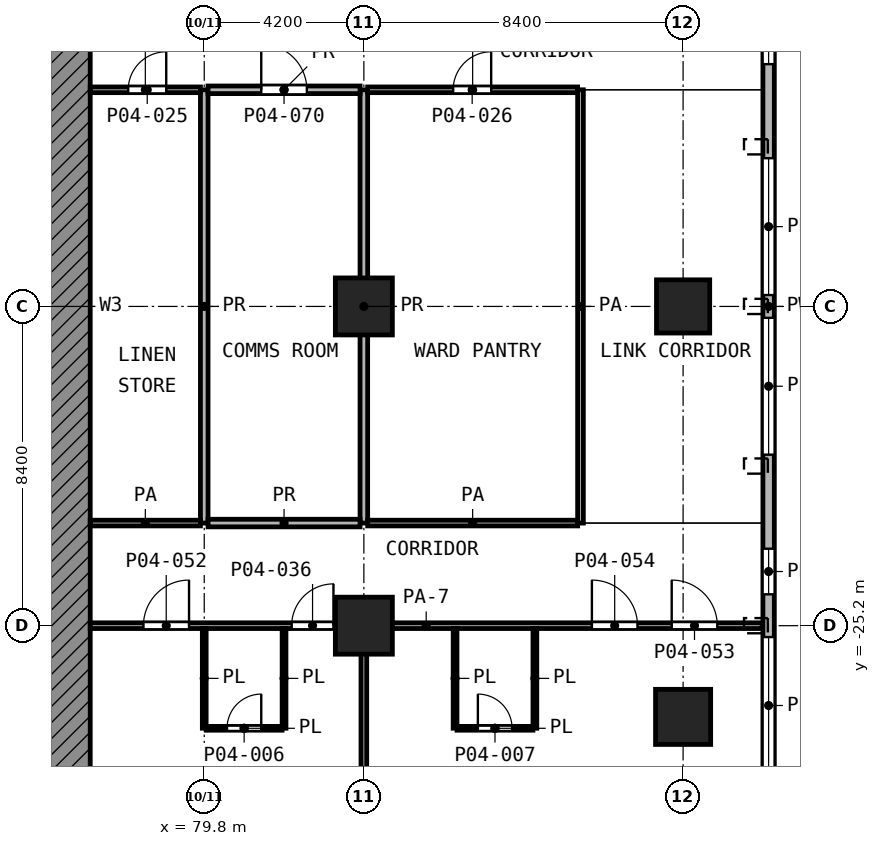
"""IFC4 building model, lengths in metres.
Left out: names, types, materials, properties, quantities, classifications, styles, units other than length and angle.
Written with IfcOpenShell. Run it as: python <this file> out.ifc"""

import sys

from ifc_helpers import new_model, si_unit, direction, frame, frame_2d, origin, origin_2d, place, context, subcontext, project, spatial, polyline, rectangle, outline, extrude, element, fill, save


model = new_model("IFC4")
c1 = context("Model", 3, precision=1e-05, world=origin(), true_north=direction((0.0, 1.0)))
c2 = subcontext(c1, "Body", "Model", "MODEL_VIEW")
j1 = project(units=[si_unit("LENGTHUNIT", "METRE"), si_unit("PLANEANGLEUNIT", "RADIAN")], contexts=[c1])
p1 = place(None, origin())
s1 = spatial("IfcSite", under=j1, at=p1, CompositionType="ELEMENT")
p2 = place(p1, origin())
s2 = spatial("IfcBuilding", under=s1, at=p2, CompositionType="ELEMENT")
p3 = place(p2, frame((0.0, 0.0, 18.2)))
s3 = spatial("IfcBuildingStorey", under=s2, at=p3, CompositionType="ELEMENT", Elevation=18.2)
p4 = place(p3, frame((84.0, -16.8, 0.0), z_axis=(0.0, 0.0, 1.0), x_axis=(1.0, 0.0, 0.0)))
e1 = element("IfcColumn", 1, at=p4, inside=s3, PredefinedType="COLUMN", context=c2, shape_type="SweptSolid", body=[
    extrude(rectangle(XDim=1.5, YDim=1.5, at=origin_2d()), origin(), (0.0, 0.0, 1.0), 5.6),
])
p5 = place(p3, frame((92.4, -16.8, 0.0), z_axis=(0.0, 0.0, 1.0), x_axis=(1.0, 0.0, 0.0)))
e2 = element("IfcColumn", 2, at=p5, inside=s3, PredefinedType="COLUMN", context=c2, shape_type="SweptSolid", body=[
    extrude(rectangle(XDim=1.4, YDim=1.4, at=origin_2d()), origin(), (0.0, 0.0, 1.0), 5.6),
])
p6 = place(p3, frame((84.0, -25.2, 0.0), z_axis=(0.0, 0.0, 1.0), x_axis=(1.0, 0.0, 0.0)))
e3 = element("IfcColumn", 3, at=p6, inside=s3, PredefinedType="COLUMN", context=c2, shape_type="SweptSolid", body=[
    extrude(rectangle(XDim=1.5, YDim=1.5, at=origin_2d()), origin(), (0.0, 0.0, 1.0), 5.6),
])
p7 = place(p3, frame((92.4, -27.6, 0.0), z_axis=(0.0, 0.0, 1.0), x_axis=(1.0, 0.0, 0.0)))
e4 = element("IfcColumn", 4, at=p7, inside=s3, PredefinedType="COLUMN", context=c2, shape_type="SweptSolid", body=[
    extrude(rectangle(XDim=1.45, YDim=1.45, at=origin_2d()), origin(), (0.0, 0.0, 1.0), 5.6),
])
p8 = place(p3, frame((0.0, 0.0, -18.2), z_axis=(0.0, -1.0, 0.0), x_axis=(1.0, 0.0, 0.0)))
e5 = element("IfcWall", 5, at=p8, inside=s3, PredefinedType="SHEAR", context=c2, shape_type="SweptSolid", body=[
    extrude(outline(polyline([(76.8, 23.25), (76.8, 18.2), (71.462, 18.2), (70.576, 19.406), (68.994, 21.022), (67.2, 22.4), (67.2, 23.25), (76.8, 23.25)])), origin(), (0.0, 0.0, 1.0), 33.6),
])
p9 = place(p3, frame((94.65, -29.938, 0.0), z_axis=(0.0, 0.0, 1.0), x_axis=(0.0, 1.0, 0.0)))
e6 = element("IfcWall", 6, at=p9, inside=s3, PredefinedType="SOLIDWALL", context=c2, shape_type="SweptSolid", body=[
    extrude(rectangle(XDim=26.276, YDim=0.3, at=frame_2d((13.138, 0.0))), origin(), (0.0, 0.0, 1.0), 5.05),
])
p10 = place(p9, frame((0.838, 0.0, 0.9)))
e7 = element("IfcOpeningElement", 7, at=p10, cuts=e6, PredefinedType="OPENING", context=c2, shape_type="SweptSolid", body=[
    extrude(rectangle(XDim=3.6, YDim=3.0, at=frame_2d((1.8, 1.5))), frame((0.0, 0.16, 0.0), z_axis=(0.0, -1.0, 0.0), x_axis=(1.0, 0.0, 0.0)), (0.0, 0.0, 1.0), 0.32),
])
p11 = place(p9, frame((5.563, 0.0, 0.9)))
e8 = element("IfcOpeningElement", 8, at=p11, cuts=e6, PredefinedType="OPENING", context=c2, shape_type="SweptSolid", body=[
    extrude(rectangle(XDim=1.2, YDim=3.0, at=frame_2d((0.6, 1.5))), frame((0.0, 0.16, 0.0), z_axis=(0.0, -1.0, 0.0), x_axis=(1.0, 0.0, 0.0)), (0.0, 0.0, 1.0), 0.32),
])
p12 = place(p9, frame((9.238, 0.0, 0.9)))
e9 = element("IfcOpeningElement", 9, at=p12, cuts=e6, PredefinedType="OPENING", context=c2, shape_type="SweptSolid", body=[
    extrude(rectangle(XDim=3.6, YDim=3.0, at=frame_2d((1.8, 1.5))), frame((0.0, 0.16, 0.0), z_axis=(0.0, -1.0, 0.0), x_axis=(1.0, 0.0, 0.0)), (0.0, 0.0, 1.0), 0.32),
])
p13 = place(p9, frame((13.438, 0.0, 0.9)))
e10 = element("IfcOpeningElement", 10, at=p13, cuts=e6, PredefinedType="OPENING", context=c2, shape_type="SweptSolid", body=[
    extrude(rectangle(XDim=3.6, YDim=3.0, at=frame_2d((1.8, 1.5))), frame((0.0, 0.16, 0.0), z_axis=(0.0, -1.0, 0.0), x_axis=(1.0, 0.0, 0.0)), (0.0, 0.0, 1.0), 0.32),
])
p14 = place(p9, frame((19.513, 0.0, 0.9)))
e11 = element("IfcOpeningElement", 11, at=p14, cuts=e6, PredefinedType="OPENING", context=c2, shape_type="SweptSolid", body=[
    extrude(rectangle(XDim=1.2, YDim=3.0, at=frame_2d((0.6, 1.5))), frame((0.0, 0.16, 0.0), z_axis=(0.0, -1.0, 0.0), x_axis=(1.0, 0.0, 0.0)), (0.0, 0.0, 1.0), 0.32),
])
p15 = place(p9, frame((21.838, 0.0, 0.9)))
e12 = element("IfcOpeningElement", 12, at=p15, cuts=e6, PredefinedType="OPENING", context=c2, shape_type="SweptSolid", body=[
    extrude(rectangle(XDim=3.6, YDim=3.0, at=frame_2d((1.8, 1.5))), frame((0.0, 0.16, 0.0), z_axis=(0.0, -1.0, 0.0), x_axis=(1.0, 0.0, 0.0)), (0.0, 0.0, 1.0), 0.32),
])
p16 = place(p3, frame((79.852, -27.9, 0.0), z_axis=(0.0, 0.0, 1.0), x_axis=(1.0, 0.0, 0.0)))
e13 = element("IfcWall", 13, at=p16, inside=s3, PredefinedType="PARTITIONING", context=c2, shape_type="SweptSolid", body=[
    extrude(rectangle(XDim=1.996, YDim=0.1, at=frame_2d((0.998, 0.0))), origin(), (0.0, 0.0, 1.0), 5.05),
])
p17 = place(p16, frame((0.548, 0.0, 0.0)))
e14 = element("IfcOpeningElement", 14, at=p17, cuts=e13, PredefinedType="OPENING", context=c2, shape_type="SweptSolid", body=[
    extrude(rectangle(XDim=0.9, YDim=2.1, at=frame_2d((0.45, 1.05))), frame((0.0, 0.06, 0.0), z_axis=(0.0, -1.0, 0.0), x_axis=(1.0, 0.0, 0.0)), (0.0, 0.0, 1.0), 0.12),
])
p18 = place(p3, frame((86.452, -27.9, 0.0), z_axis=(0.0, 0.0, 1.0), x_axis=(1.0, 0.0, 0.0)))
e15 = element("IfcWall", 15, at=p18, inside=s3, PredefinedType="PARTITIONING", context=c2, shape_type="SweptSolid", body=[
    extrude(rectangle(XDim=1.996, YDim=0.1, at=frame_2d((0.998, 0.0))), origin(), (0.0, 0.0, 1.0), 5.05),
])
p19 = place(p18, frame((0.548, 0.0, 0.0)))
e16 = element("IfcOpeningElement", 16, at=p19, cuts=e15, PredefinedType="OPENING", context=c2, shape_type="SweptSolid", body=[
    extrude(rectangle(XDim=0.9, YDim=2.1, at=frame_2d((0.45, 1.05))), frame((0.0, 0.06, 0.0), z_axis=(0.0, -1.0, 0.0), x_axis=(1.0, 0.0, 0.0)), (0.0, 0.0, 1.0), 0.12),
])
p20 = place(p3, frame((79.8, -27.898, 0.0), z_axis=(0.0, 0.0, 1.0), x_axis=(0.0, 1.0, 0.0)))
e17 = element("IfcWall", 17, at=p20, inside=s3, PredefinedType="PARTITIONING", context=c2, shape_type="SweptSolid", body=[
    extrude(rectangle(XDim=2.623, YDim=0.1, at=frame_2d((1.312, 0.0))), origin(), (0.0, 0.0, 1.0), 5.05),
])
p21 = place(p3, frame((81.9, -27.899, 0.0), z_axis=(0.0, 0.0, 1.0), x_axis=(0.0, 1.0, 0.0)))
e18 = element("IfcWall", 18, at=p21, inside=s3, PredefinedType="PARTITIONING", context=c2, shape_type="SweptSolid", body=[
    extrude(rectangle(XDim=2.624, YDim=0.1, at=frame_2d((1.312, 0.0))), origin(), (0.0, 0.0, 1.0), 5.05),
])
p22 = place(p3, frame((86.4, -27.898, 0.0), z_axis=(0.0, 0.0, 1.0), x_axis=(0.0, 1.0, 0.0)))
e19 = element("IfcWall", 19, at=p22, inside=s3, PredefinedType="PARTITIONING", context=c2, shape_type="SweptSolid", body=[
    extrude(rectangle(XDim=2.623, YDim=0.1, at=frame_2d((1.312, 0.0))), origin(), (0.0, 0.0, 1.0), 5.05),
])
p23 = place(p3, frame((88.5, -27.899, 0.0), z_axis=(0.0, 0.0, 1.0), x_axis=(0.0, 1.0, 0.0)))
e20 = element("IfcWall", 20, at=p23, inside=s3, PredefinedType="PARTITIONING", context=c2, shape_type="SweptSolid", body=[
    extrude(rectangle(XDim=2.624, YDim=0.1, at=frame_2d((1.312, 0.0))), origin(), (0.0, 0.0, 1.0), 5.05),
])
p24 = place(p3, frame((76.8, -25.2, 0.0), z_axis=(0.0, 0.0, 1.0), x_axis=(1.0, 0.0, 0.0)))
e21 = element("IfcWall", 21, at=p24, inside=s3, PredefinedType="PARTITIONING", context=c2, shape_type="SweptSolid", body=[
    extrude(rectangle(XDim=17.68, YDim=0.15, at=frame_2d((8.84, 0.0))), origin(), (0.0, 0.0, 1.0), 3.65),
])
p25 = place(p24, frame((1.4, 0.0, 0.0)))
e22 = element("IfcOpeningElement", 22, at=p25, cuts=e21, PredefinedType="OPENING", context=c2, shape_type="SweptSolid", body=[
    extrude(rectangle(XDim=1.2, YDim=2.1, at=frame_2d((0.6, 1.05))), frame((0.0, 0.085, 0.0), z_axis=(0.0, -1.0, 0.0), x_axis=(1.0, 0.0, 0.0)), (0.0, 0.0, 1.0), 0.17),
])
p26 = place(p24, frame((5.3, 0.0, 0.0)))
e23 = element("IfcOpeningElement", 23, at=p26, cuts=e21, PredefinedType="OPENING", context=c2, shape_type="SweptSolid", body=[
    extrude(rectangle(XDim=1.1, YDim=2.1, at=frame_2d((0.55, 1.05))), frame((0.0, 0.085, 0.0), z_axis=(0.0, -1.0, 0.0), x_axis=(1.0, 0.0, 0.0)), (0.0, 0.0, 1.0), 0.17),
])
p27 = place(p24, frame((15.3, 0.0, 0.0)))
e24 = element("IfcOpeningElement", 24, at=p27, cuts=e21, PredefinedType="OPENING", context=c2, shape_type="SweptSolid", body=[
    extrude(rectangle(XDim=1.2, YDim=2.1, at=frame_2d((0.6, 1.05))), frame((0.0, 0.085, 0.0), z_axis=(0.0, -1.0, 0.0), x_axis=(1.0, 0.0, 0.0)), (0.0, 0.0, 1.0), 0.17),
])
p28 = place(p24, frame((13.2, 0.0, 0.0)))
e25 = element("IfcOpeningElement", 25, at=p28, cuts=e21, PredefinedType="OPENING", context=c2, shape_type="SweptSolid", body=[
    extrude(rectangle(XDim=1.2, YDim=2.1, at=frame_2d((0.6, 1.05))), frame((0.0, 0.085, 0.0), z_axis=(0.0, -1.0, 0.0), x_axis=(1.0, 0.0, 0.0)), (0.0, 0.0, 1.0), 0.17),
])
p29 = place(p3, frame((76.8, -22.5, 0.0), z_axis=(0.0, 0.0, 1.0), x_axis=(1.0, 0.0, 0.0)))
e26 = element("IfcWall", 26, at=p29, inside=s3, PredefinedType="PARTITIONING", context=c2, shape_type="SweptSolid", body=[
    extrude(rectangle(XDim=2.9, YDim=0.15, at=frame_2d((1.45, 0.0))), origin(), (0.0, 0.0, 1.0), 5.05),
])
p30 = place(p3, frame((84.1, -22.5, 0.0), z_axis=(0.0, 0.0, 1.0), x_axis=(1.0, 0.0, 0.0)))
e27 = element("IfcWall", 27, at=p30, inside=s3, PredefinedType="PARTITIONING", context=c2, shape_type="SweptSolid", body=[
    extrude(rectangle(XDim=5.525, YDim=0.15, at=frame_2d((2.762, 0.0))), origin(), (0.0, 0.0, 1.0), 5.05),
])
p31 = place(p3, frame((76.8, -11.1, 0.0), z_axis=(0.0, 0.0, 1.0), x_axis=(1.0, 0.0, 0.0)))
e28 = element("IfcWall", 28, at=p31, inside=s3, PredefinedType="PARTITIONING", context=c2, shape_type="SweptSolid", body=[
    extrude(rectangle(XDim=2.9, YDim=0.15, at=frame_2d((1.45, 0.0))), origin(), (0.0, 0.0, 1.0), 5.05),
])
p32 = place(p31, frame((1.0, 0.0, 0.0)))
e29 = element("IfcOpeningElement", 29, at=p32, cuts=e28, PredefinedType="OPENING", context=c2, shape_type="SweptSolid", body=[
    extrude(rectangle(XDim=1.0, YDim=2.1, at=frame_2d((0.5, 1.05))), frame((0.0, 0.085, 0.0), z_axis=(0.0, -1.0, 0.0), x_axis=(1.0, 0.0, 0.0)), (0.0, 0.0, 1.0), 0.17),
])
p33 = place(p3, frame((84.1, -11.1, 0.0), z_axis=(0.0, 0.0, 1.0), x_axis=(1.0, 0.0, 0.0)))
e30 = element("IfcWall", 30, at=p33, inside=s3, PredefinedType="PARTITIONING", context=c2, shape_type="SweptSolid", body=[
    extrude(rectangle(XDim=5.525, YDim=0.15, at=frame_2d((2.762, 0.0))), origin(), (0.0, 0.0, 1.0), 5.05),
])
p34 = place(p33, frame((2.25, 0.0, 0.0)))
e31 = element("IfcOpeningElement", 31, at=p34, cuts=e30, PredefinedType="OPENING", context=c2, shape_type="SweptSolid", body=[
    extrude(rectangle(XDim=1.0, YDim=2.1, at=frame_2d((0.5, 1.05))), frame((0.0, 0.085, 0.0), z_axis=(0.0, -1.0, 0.0), x_axis=(1.0, 0.0, 0.0)), (0.0, 0.0, 1.0), 0.17),
])
p35 = place(p3, frame((84.0, -35.68, 0.0), z_axis=(0.0, 0.0, 1.0), x_axis=(0.0, 1.0, 0.0)))
e32 = element("IfcWall", 32, at=p35, inside=s3, PredefinedType="PARTITIONING", context=c2, shape_type="SweptSolid", body=[
    extrude(rectangle(XDim=10.405, YDim=0.15, at=frame_2d((5.203, 0.0))), origin(), (0.0, 0.0, 1.0), 5.05),
])
p36 = place(p3, frame((89.7, -22.5, 0.0), z_axis=(0.0, 0.0, 1.0), x_axis=(0.0, 1.0, 0.0)))
e33 = element("IfcWall", 33, at=p36, inside=s3, PredefinedType="PARTITIONING", context=c2, shape_type="SweptSolid", body=[
    extrude(rectangle(XDim=11.4, YDim=0.15, at=frame_2d((5.7, 0.0))), origin(), (0.0, 0.0, 1.0), 5.05),
])
p37 = place(p3, frame((79.9, -22.5, 0.0), z_axis=(0.0, 0.0, 1.0), x_axis=(1.0, 0.0, 0.0)))
e34 = element("IfcWall", 34, at=p37, inside=s3, PredefinedType="PARTITIONING", context=c2, shape_type="SweptSolid", body=[
    extrude(rectangle(XDim=4.0, YDim=0.2, at=frame_2d((2.0, 0.0))), origin(), (0.0, 0.0, 1.0), 5.05),
])
p38 = place(p3, frame((79.9, -11.1, 0.0), z_axis=(0.0, 0.0, 1.0), x_axis=(1.0, 0.0, 0.0)))
e35 = element("IfcWall", 35, at=p38, inside=s3, PredefinedType="PARTITIONING", context=c2, shape_type="SweptSolid", body=[
    extrude(rectangle(XDim=4.0, YDim=0.2, at=frame_2d((2.0, 0.0))), origin(), (0.0, 0.0, 1.0), 5.05),
])
p39 = place(p38, frame((1.4, 0.0, 0.0)))
e36 = element("IfcOpeningElement", 36, at=p39, cuts=e35, PredefinedType="OPENING", context=c2, shape_type="SweptSolid", body=[
    extrude(rectangle(XDim=1.2, YDim=2.1, at=frame_2d((0.6, 1.05))), frame((0.0, 0.11, 0.0), z_axis=(0.0, -1.0, 0.0), x_axis=(1.0, 0.0, 0.0)), (0.0, 0.0, 1.0), 0.22),
])
for number, where, z_axis, x_axis in (
    (37, (79.8, -22.5, 0.0), (0.0, 0.0, 1.0), (0.0, 1.0, 0.0)),
    (38, (84.0, -22.5, 0.0), (0.0, 0.0, 1.0), (0.0, 1.0, 0.0)),
):
    element("IfcWall", number, at=place(p3, frame(where, z_axis=z_axis, x_axis=x_axis)), inside=s3, PredefinedType="PARTITIONING", context=c2, shape_type="SweptSolid", body=[
        extrude(rectangle(XDim=11.4, YDim=0.2, at=frame_2d((5.7, 0.0))), origin(), (0.0, 0.0, 1.0), 5.05),
    ])
p40 = place(p10, origin())
e39 = element("IfcWindow", 39, at=p40, inside=s3, PartitioningType="SINGLE_PANEL", PredefinedType="WINDOW", context=c2, shape_type="SweptSolid", body=[
    extrude(rectangle(XDim=3.6, YDim=3.0, at=frame_2d((1.8, 1.5))), frame((0.0, 0.03, 0.0), z_axis=(0.0, -1.0, 0.0), x_axis=(1.0, 0.0, 0.0)), (0.0, 0.0, 1.0), 0.06),
])
fill(e7, e39)
p41 = place(p11, origin())
e40 = element("IfcWindow", 40, at=p41, inside=s3, PartitioningType="SINGLE_PANEL", PredefinedType="WINDOW", context=c2, shape_type="SweptSolid", body=[
    extrude(rectangle(XDim=1.2, YDim=3.0, at=frame_2d((0.6, 1.5))), frame((0.0, 0.03, 0.0), z_axis=(0.0, -1.0, 0.0), x_axis=(1.0, 0.0, 0.0)), (0.0, 0.0, 1.0), 0.06),
])
fill(e8, e40)
p42 = place(p12, origin())
e41 = element("IfcWindow", 41, at=p42, inside=s3, PartitioningType="SINGLE_PANEL", PredefinedType="WINDOW", context=c2, shape_type="SweptSolid", body=[
    extrude(rectangle(XDim=3.6, YDim=3.0, at=frame_2d((1.8, 1.5))), frame((0.0, 0.03, 0.0), z_axis=(0.0, -1.0, 0.0), x_axis=(1.0, 0.0, 0.0)), (0.0, 0.0, 1.0), 0.06),
])
fill(e9, e41)
p43 = place(p13, origin())
e42 = element("IfcWindow", 42, at=p43, inside=s3, PartitioningType="SINGLE_PANEL", PredefinedType="WINDOW", context=c2, shape_type="SweptSolid", body=[
    extrude(rectangle(XDim=3.6, YDim=3.0, at=frame_2d((1.8, 1.5))), frame((0.0, 0.03, 0.0), z_axis=(0.0, -1.0, 0.0), x_axis=(1.0, 0.0, 0.0)), (0.0, 0.0, 1.0), 0.06),
])
fill(e10, e42)
p44 = place(p14, origin())
e43 = element("IfcWindow", 43, at=p44, inside=s3, PartitioningType="SINGLE_PANEL", PredefinedType="WINDOW", context=c2, shape_type="SweptSolid", body=[
    extrude(rectangle(XDim=1.2, YDim=3.0, at=frame_2d((0.6, 1.5))), frame((0.0, 0.03, 0.0), z_axis=(0.0, -1.0, 0.0), x_axis=(1.0, 0.0, 0.0)), (0.0, 0.0, 1.0), 0.06),
])
fill(e11, e43)
p45 = place(p32, origin())
e44 = element("IfcDoor", 44, at=p45, inside=s3, OperationType="SINGLE_SWING_RIGHT", PredefinedType="DOOR", context=c2, shape_type="SweptSolid", body=[
    extrude(rectangle(XDim=1.0, YDim=2.1, at=frame_2d((0.5, 1.05))), frame((0.0, 0.025, 0.0), z_axis=(0.0, -1.0, 0.0), x_axis=(1.0, 0.0, 0.0)), (0.0, 0.0, 1.0), 0.05),
])
fill(e29, e44)
p46 = place(p39, origin())
e45 = element("IfcDoor", 45, at=p46, inside=s3, OperationType="SINGLE_SWING_LEFT", PredefinedType="DOOR", context=c2, shape_type="SweptSolid", body=[
    extrude(rectangle(XDim=1.2, YDim=2.1, at=frame_2d((0.6, 1.05))), frame((0.0, 0.025, 0.0), z_axis=(0.0, -1.0, 0.0), x_axis=(1.0, 0.0, 0.0)), (0.0, 0.0, 1.0), 0.05),
])
fill(e36, e45)
p47 = place(p34, origin())
e46 = element("IfcDoor", 46, at=p47, inside=s3, OperationType="SINGLE_SWING_RIGHT", PredefinedType="DOOR", context=c2, shape_type="SweptSolid", body=[
    extrude(rectangle(XDim=1.0, YDim=2.1, at=frame_2d((0.5, 1.05))), frame((0.0, 0.025, 0.0), z_axis=(0.0, -1.0, 0.0), x_axis=(1.0, 0.0, 0.0)), (0.0, 0.0, 1.0), 0.05),
])
fill(e31, e46)
p48 = place(p25, origin())
e47 = element("IfcDoor", 47, at=p48, inside=s3, OperationType="SINGLE_SWING_RIGHT", PredefinedType="DOOR", context=c2, shape_type="SweptSolid", body=[
    extrude(rectangle(XDim=1.2, YDim=2.1, at=frame_2d((0.6, 1.05))), frame((0.0, 0.025, 0.0), z_axis=(0.0, -1.0, 0.0), x_axis=(1.0, 0.0, 0.0)), (0.0, 0.0, 1.0), 0.05),
])
fill(e22, e47)
p49 = place(p26, origin())
e48 = element("IfcDoor", 48, at=p49, inside=s3, OperationType="SINGLE_SWING_RIGHT", PredefinedType="DOOR", context=c2, shape_type="SweptSolid", body=[
    extrude(rectangle(XDim=1.1, YDim=2.1, at=frame_2d((0.55, 1.05))), frame((0.0, 0.025, 0.0), z_axis=(0.0, -1.0, 0.0), x_axis=(1.0, 0.0, 0.0)), (0.0, 0.0, 1.0), 0.05),
])
fill(e23, e48)
p50 = place(p17, origin())
e49 = element("IfcDoor", 49, at=p50, inside=s3, OperationType="SINGLE_SWING_RIGHT", PredefinedType="DOOR", context=c2, shape_type="SweptSolid", body=[
    extrude(rectangle(XDim=0.9, YDim=2.1, at=frame_2d((0.45, 1.05))), frame((0.0, 0.025, 0.0), z_axis=(0.0, -1.0, 0.0), x_axis=(1.0, 0.0, 0.0)), (0.0, 0.0, 1.0), 0.05),
])
fill(e14, e49)
p51 = place(p27, origin())
e50 = element("IfcDoor", 50, at=p51, inside=s3, OperationType="SINGLE_SWING_LEFT", PredefinedType="DOOR", context=c2, shape_type="SweptSolid", body=[
    extrude(rectangle(XDim=1.2, YDim=2.1, at=frame_2d((0.6, 1.05))), frame((0.0, 0.025, 0.0), z_axis=(0.0, -1.0, 0.0), x_axis=(1.0, 0.0, 0.0)), (0.0, 0.0, 1.0), 0.05),
])
fill(e24, e50)
p52 = place(p28, origin())
e51 = element("IfcDoor", 51, at=p52, inside=s3, OperationType="SINGLE_SWING_LEFT", PredefinedType="DOOR", context=c2, shape_type="SweptSolid", body=[
    extrude(rectangle(XDim=1.2, YDim=2.1, at=frame_2d((0.6, 1.05))), frame((0.0, 0.025, 0.0), z_axis=(0.0, -1.0, 0.0), x_axis=(1.0, 0.0, 0.0)), (0.0, 0.0, 1.0), 0.05),
])
fill(e25, e51)
p53 = place(p19, origin())
e52 = element("IfcDoor", 52, at=p53, inside=s3, OperationType="SINGLE_SWING_LEFT", PredefinedType="DOOR", context=c2, shape_type="SweptSolid", body=[
    extrude(rectangle(XDim=0.9, YDim=2.1, at=frame_2d((0.45, 1.05))), frame((0.0, 0.025, 0.0), z_axis=(0.0, -1.0, 0.0), x_axis=(1.0, 0.0, 0.0)), (0.0, 0.0, 1.0), 0.05),
])
fill(e16, e52)
save(model, sys.argv[1])
